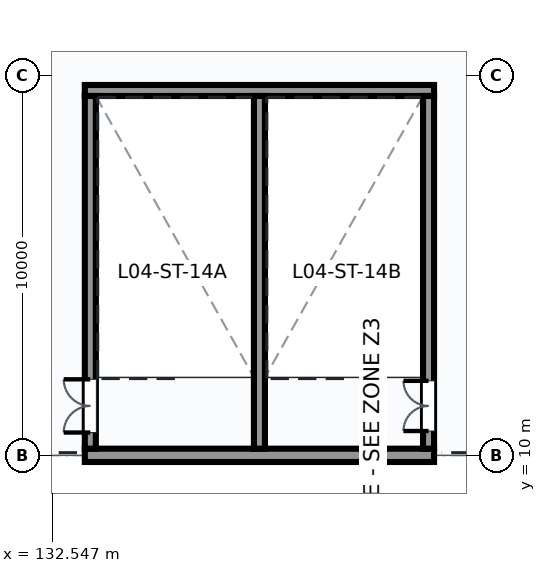
"""IFC4 building model, lengths in metres.
Left out: names, types, materials, properties, quantities, classifications, styles, units other than length and angle.
Written with IfcOpenShell. Run it as: python <this file> out.ifc"""

import sys

from ifc_helpers import new_model, si_unit, direction, frame, frame_2d, origin, place, context, subcontext, project, spatial, rectangle, extrude, element, fill, save


model = new_model("IFC4")
c1 = context("Model", 3, precision=1e-05, world=origin(), true_north=direction((0.0, 1.0)))
c2 = subcontext(c1, "Body", "Model", "MODEL_VIEW")
j1 = project(units=[si_unit("LENGTHUNIT", "METRE"), si_unit("PLANEANGLEUNIT", "RADIAN")], contexts=[c1])
p1 = place(None, origin())
s1 = spatial("IfcSite", under=j1, at=p1, CompositionType="ELEMENT")
p2 = place(p1, origin())
s2 = spatial("IfcBuilding", under=s1, at=p2, CompositionType="ELEMENT")
p3 = place(p2, frame((0.0, 0.0, 19.2)))
s3 = spatial("IfcBuildingStorey", under=s2, at=p3, CompositionType="ELEMENT", Elevation=19.2)
p4 = place(p3, frame((133.405, 10.0, 0.0), z_axis=(0.0, 0.0, 1.0), x_axis=(1.0, 0.0, 0.0)))
e1 = element("IfcWall", 1, at=p4, inside=s3, PredefinedType="SHEAR", context=c2, shape_type="SweptSolid", body=[
    extrude(rectangle(XDim=9.19, YDim=0.35, at=frame_2d((4.595, 0.0))), origin(), (0.0, 0.0, 1.0), 4.836),
])
p5 = place(p3, frame((133.405, 19.6, 0.0), z_axis=(0.0, 0.0, 1.0), x_axis=(1.0, 0.0, 0.0)))
e2 = element("IfcWall", 2, at=p5, inside=s3, PredefinedType="SHEAR", context=c2, shape_type="SweptSolid", body=[
    extrude(rectangle(XDim=9.19, YDim=0.29, at=frame_2d((4.595, 0.0))), origin(), (0.0, 0.0, 1.0), 5.4),
])
p6 = place(p3, frame((133.55, 10.175, 0.0), z_axis=(0.0, 0.0, 1.0), x_axis=(0.0, 1.0, 0.0)))
e3 = element("IfcWall", 3, at=p6, inside=s3, PredefinedType="SHEAR", context=c2, shape_type="SweptSolid", body=[
    extrude(rectangle(XDim=9.28, YDim=0.29, at=frame_2d((4.64, 0.0))), origin(), (0.0, 0.0, 1.0), 5.4),
])
p7 = place(p6, frame((0.425, 0.0, 0.0)))
e4 = element("IfcOpeningElement", 4, at=p7, cuts=e3, PredefinedType="OPENING", context=c2, shape_type="SweptSolid", body=[
    extrude(rectangle(XDim=1.4, YDim=2.2, at=frame_2d((0.7, 1.1))), frame((0.0, 0.155, 0.0), z_axis=(0.0, -1.0, 0.0), x_axis=(1.0, 0.0, 0.0)), (0.0, 0.0, 1.0), 0.31),
])
p8 = place(p3, frame((142.45, 10.175, 0.0), z_axis=(0.0, 0.0, 1.0), x_axis=(0.0, 1.0, 0.0)))
e5 = element("IfcWall", 5, at=p8, inside=s3, PredefinedType="SHEAR", context=c2, shape_type="SweptSolid", body=[
    extrude(rectangle(XDim=9.28, YDim=0.29, at=frame_2d((4.64, 0.0))), origin(), (0.0, 0.0, 1.0), 5.4),
])
p9 = place(p8, frame((0.465, 0.0, 0.0)))
e6 = element("IfcOpeningElement", 6, at=p9, cuts=e5, PredefinedType="OPENING", context=c2, shape_type="SweptSolid", body=[
    extrude(rectangle(XDim=1.32, YDim=2.2, at=frame_2d((0.66, 1.1))), frame((0.0, 0.155, 0.0), z_axis=(0.0, -1.0, 0.0), x_axis=(1.0, 0.0, 0.0)), (0.0, 0.0, 1.0), 0.31),
])
p10 = place(p3, frame((138.0, 10.175, 0.0), z_axis=(0.0, 0.0, 1.0), x_axis=(0.0, 1.0, 0.0)))
e7 = element("IfcWall", 7, at=p10, inside=s3, PredefinedType="SHEAR", context=c2, shape_type="SweptSolid", body=[
    extrude(rectangle(XDim=9.28, YDim=0.29, at=frame_2d((4.64, 0.0))), origin(), (0.0, 0.0, 1.0), 5.4),
])
p11 = place(p7, frame((1.4, 0.0, 0.0), z_axis=(0.0, 0.0, 1.0), x_axis=(-1.0, 0.0, 0.0)))
e8 = element("IfcDoor", 8, at=p11, inside=s3, OperationType="DOUBLE_DOOR_SINGLE_SWING", PredefinedType="DOOR", context=c2, shape_type="SweptSolid", body=[
    extrude(rectangle(XDim=1.4, YDim=2.2, at=frame_2d((0.7, 1.1))), frame((0.0, 0.025, 0.0), z_axis=(0.0, -1.0, 0.0), x_axis=(1.0, 0.0, 0.0)), (0.0, 0.0, 1.0), 0.05),
])
fill(e4, e8)
p12 = place(p9, origin())
e9 = element("IfcDoor", 9, at=p12, inside=s3, OperationType="DOUBLE_DOOR_SINGLE_SWING", PredefinedType="DOOR", context=c2, shape_type="SweptSolid", body=[
    extrude(rectangle(XDim=1.32, YDim=2.2, at=frame_2d((0.66, 1.1))), frame((0.0, 0.025, 0.0), z_axis=(0.0, -1.0, 0.0), x_axis=(1.0, 0.0, 0.0)), (0.0, 0.0, 1.0), 0.05),
])
fill(e6, e9)
save(model, sys.argv[1])
